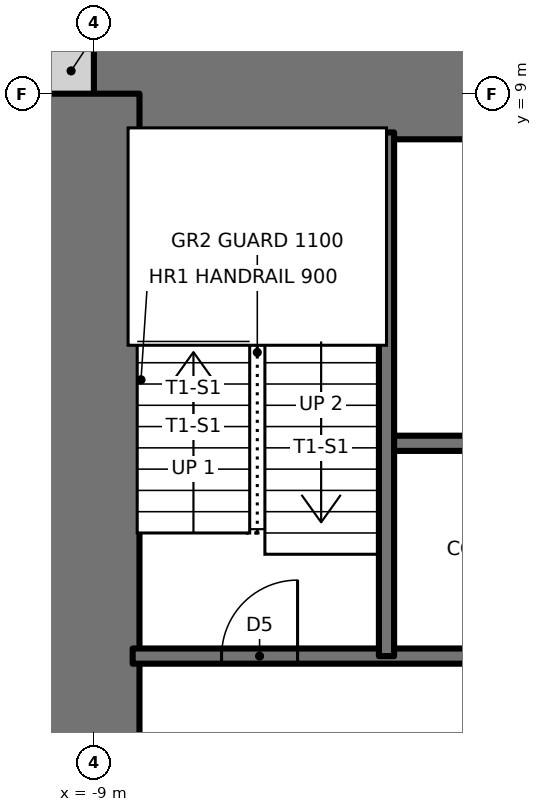
"""IFC4 building model, lengths in metres.
Left out: names, types, materials, properties, quantities, classifications, styles, units other than length and angle.
Written with IfcOpenShell. Run it as: python <this file> out.ifc"""

import sys

from ifc_helpers import new_model, si_unit, direction, frame, frame_2d, origin, place, context, subcontext, project, spatial, rectangle, extrude, element, fill, save


model = new_model("IFC4")
c1 = context("Model", 3, precision=1e-05, world=origin(), true_north=direction((0.0, 1.0)))
c2 = subcontext(c1, "Body", "Model", "MODEL_VIEW")
j1 = project(units=[si_unit("LENGTHUNIT", "METRE"), si_unit("PLANEANGLEUNIT", "RADIAN")], contexts=[c1])
p1 = place(None, origin())
s1 = spatial("IfcSite", under=j1, at=p1, CompositionType="ELEMENT")
p2 = place(p1, origin())
s2 = spatial("IfcBuilding", under=s1, at=p2, CompositionType="ELEMENT")
p3 = place(p2, frame((0.0, 0.0, 250.0)))
s3 = spatial("IfcBuildingStorey", under=s2, at=p3, CompositionType="ELEMENT", Elevation=250.0)
p4 = place(p3, frame((-9.6, 9.3, 0.0), z_axis=(0.0, 0.0, 1.0), x_axis=(1.0, 0.0, 0.0)))
e1 = element("IfcWall", 1, at=p4, inside=s3, PredefinedType="SOLIDWALL", context=c2, shape_type="SweptSolid", body=[
    extrude(rectangle(XDim=0.6, YDim=0.6, at=frame_2d((0.3, 0.0))), origin(), (0.0, 0.0, 1.0), 3.5),
])
p5 = place(p3, frame((9.0, 9.0, 0.0), z_axis=(0.0, 0.0, 1.0), x_axis=(-1.0, 0.0, 0.0)))
e2 = element("IfcWall", 2, at=p5, inside=s3, PredefinedType="SHEAR", context=c2, shape_type="SweptSolid", body=[
    extrude(rectangle(XDim=18.0, YDim=1.2, at=frame_2d((9.0, 0.0))), origin(), (0.0, 0.0, 1.0), 3.5),
])
p6 = place(p5, frame((11.125, 0.0, 0.0)))
e3 = element("IfcOpeningElement", 3, at=p6, cuts=e2, PredefinedType="OPENING", context=c2, shape_type="SweptSolid", body=[
    extrude(rectangle(XDim=0.9, YDim=2.1, at=frame_2d((0.45, 1.05))), frame((0.0, 0.61, 0.0), z_axis=(0.0, -1.0, 0.0), x_axis=(1.0, 0.0, 0.0)), (0.0, 0.0, 1.0), 1.22),
])
p7 = place(p5, frame((4.275, 0.0, 0.0)))
e4 = element("IfcOpeningElement", 4, at=p7, cuts=e2, PredefinedType="OPENING", context=c2, shape_type="SweptSolid", body=[
    extrude(rectangle(XDim=0.9, YDim=2.1, at=frame_2d((0.45, 1.05))), frame((0.0, 0.61, 0.0), z_axis=(0.0, -1.0, 0.0), x_axis=(1.0, 0.0, 0.0)), (0.0, 0.0, 1.0), 1.22),
])
p8 = place(p3, frame((-9.0, 9.0, 0.0), z_axis=(0.0, 0.0, 1.0), x_axis=(0.0, -1.0, 0.0)))
e5 = element("IfcWall", 5, at=p8, inside=s3, PredefinedType="SHEAR", context=c2, shape_type="SweptSolid", body=[
    extrude(rectangle(XDim=18.0, YDim=1.2, at=frame_2d((9.0, 0.0))), origin(), (0.0, 0.0, 1.0), 3.5),
])
p9 = place(p8, frame((8.5, 0.0, 0.0)))
e6 = element("IfcOpeningElement", 6, at=p9, cuts=e5, PredefinedType="OPENING", context=c2, shape_type="SweptSolid", body=[
    extrude(rectangle(XDim=1.0, YDim=2.1, at=frame_2d((0.5, 1.05))), frame((0.0, 0.61, 0.0), z_axis=(0.0, -1.0, 0.0), x_axis=(1.0, 0.0, 0.0)), (0.0, 0.0, 1.0), 1.22),
])
p10 = place(p3, frame((-8.49, 1.6, 0.0), z_axis=(0.0, 0.0, 1.0), x_axis=(1.0, 0.0, 0.0)))
e7 = element("IfcWall", 7, at=p10, inside=s3, PredefinedType="SOLIDWALL", context=c2, shape_type="SweptSolid", body=[
    extrude(rectangle(XDim=16.98, YDim=0.2, at=frame_2d((8.49, 0.0))), origin(), (0.0, 0.0, 1.0), 3.5),
])
p11 = place(p10, frame((1.17, 0.0, 0.0)))
e8 = element("IfcOpeningElement", 8, at=p11, cuts=e7, PredefinedType="OPENING", context=c2, shape_type="SweptSolid", body=[
    extrude(rectangle(XDim=1.0, YDim=2.1, at=frame_2d((0.5, 1.05))), frame((0.0, 0.11, 0.0), z_axis=(0.0, -1.0, 0.0), x_axis=(1.0, 0.0, 0.0)), (0.0, 0.0, 1.0), 0.22),
])
p12 = place(p10, frame((4.606, 0.0, 0.0)))
e9 = element("IfcOpeningElement", 9, at=p12, cuts=e7, PredefinedType="OPENING", context=c2, shape_type="SweptSolid", body=[
    extrude(rectangle(XDim=0.9, YDim=2.1, at=frame_2d((0.45, 1.05))), frame((0.0, 0.11, 0.0), z_axis=(0.0, -1.0, 0.0), x_axis=(1.0, 0.0, 0.0)), (0.0, 0.0, 1.0), 0.22),
])
p13 = place(p10, frame((8.04, 0.0, 0.0)))
e10 = element("IfcOpeningElement", 10, at=p13, cuts=e7, PredefinedType="OPENING", context=c2, shape_type="SweptSolid", body=[
    extrude(rectangle(XDim=0.9, YDim=2.1, at=frame_2d((0.45, 1.05))), frame((0.0, 0.11, 0.0), z_axis=(0.0, -1.0, 0.0), x_axis=(1.0, 0.0, 0.0)), (0.0, 0.0, 1.0), 0.22),
])
p14 = place(p10, frame((11.374, 0.0, 0.0)))
e11 = element("IfcOpeningElement", 11, at=p14, cuts=e7, PredefinedType="OPENING", context=c2, shape_type="SweptSolid", body=[
    extrude(rectangle(XDim=1.1, YDim=2.1, at=frame_2d((0.55, 1.05))), frame((0.0, 0.11, 0.0), z_axis=(0.0, -1.0, 0.0), x_axis=(1.0, 0.0, 0.0)), (0.0, 0.0, 1.0), 0.22),
])
p15 = place(p10, frame((14.66, 0.0, 0.0)))
e12 = element("IfcOpeningElement", 12, at=p15, cuts=e7, PredefinedType="OPENING", context=c2, shape_type="SweptSolid", body=[
    extrude(rectangle(XDim=1.3, YDim=2.1, at=frame_2d((0.65, 1.05))), frame((0.0, 0.11, 0.0), z_axis=(0.0, -1.0, 0.0), x_axis=(1.0, 0.0, 0.0)), (0.0, 0.0, 1.0), 0.22),
])
p16 = place(p3, frame((-5.15, 4.4, 0.0), z_axis=(0.0, 0.0, 1.0), x_axis=(1.0, 0.0, 0.0)))
e13 = element("IfcWall", 13, at=p16, inside=s3, PredefinedType="SOLIDWALL", context=c2, shape_type="SweptSolid", body=[
    extrude(rectangle(XDim=10.3, YDim=0.2, at=frame_2d((5.15, 0.0))), origin(), (0.0, 0.0, 1.0), 3.5),
])
p17 = place(p3, frame((-5.15, 1.6, 0.0), z_axis=(0.0, 0.0, 1.0), x_axis=(0.0, 1.0, 0.0)))
e14 = element("IfcWall", 14, at=p17, inside=s3, PredefinedType="SOLIDWALL", context=c2, shape_type="SweptSolid", body=[
    extrude(rectangle(XDim=6.89, YDim=0.2, at=frame_2d((3.445, 0.0))), origin(), (0.0, 0.0, 1.0), 3.5),
])
p18 = place(p11, origin())
e15 = element("IfcDoor", 15, at=p18, inside=s3, OperationType="SINGLE_SWING_RIGHT", PredefinedType="DOOR", context=c2, shape_type="SweptSolid", body=[
    extrude(rectangle(XDim=1.0, YDim=2.1, at=frame_2d((0.5, 1.05))), frame((0.0, 0.025, 0.0), z_axis=(0.0, -1.0, 0.0), x_axis=(1.0, 0.0, 0.0)), (0.0, 0.0, 1.0), 0.05),
])
fill(e8, e15)
save(model, sys.argv[1])
